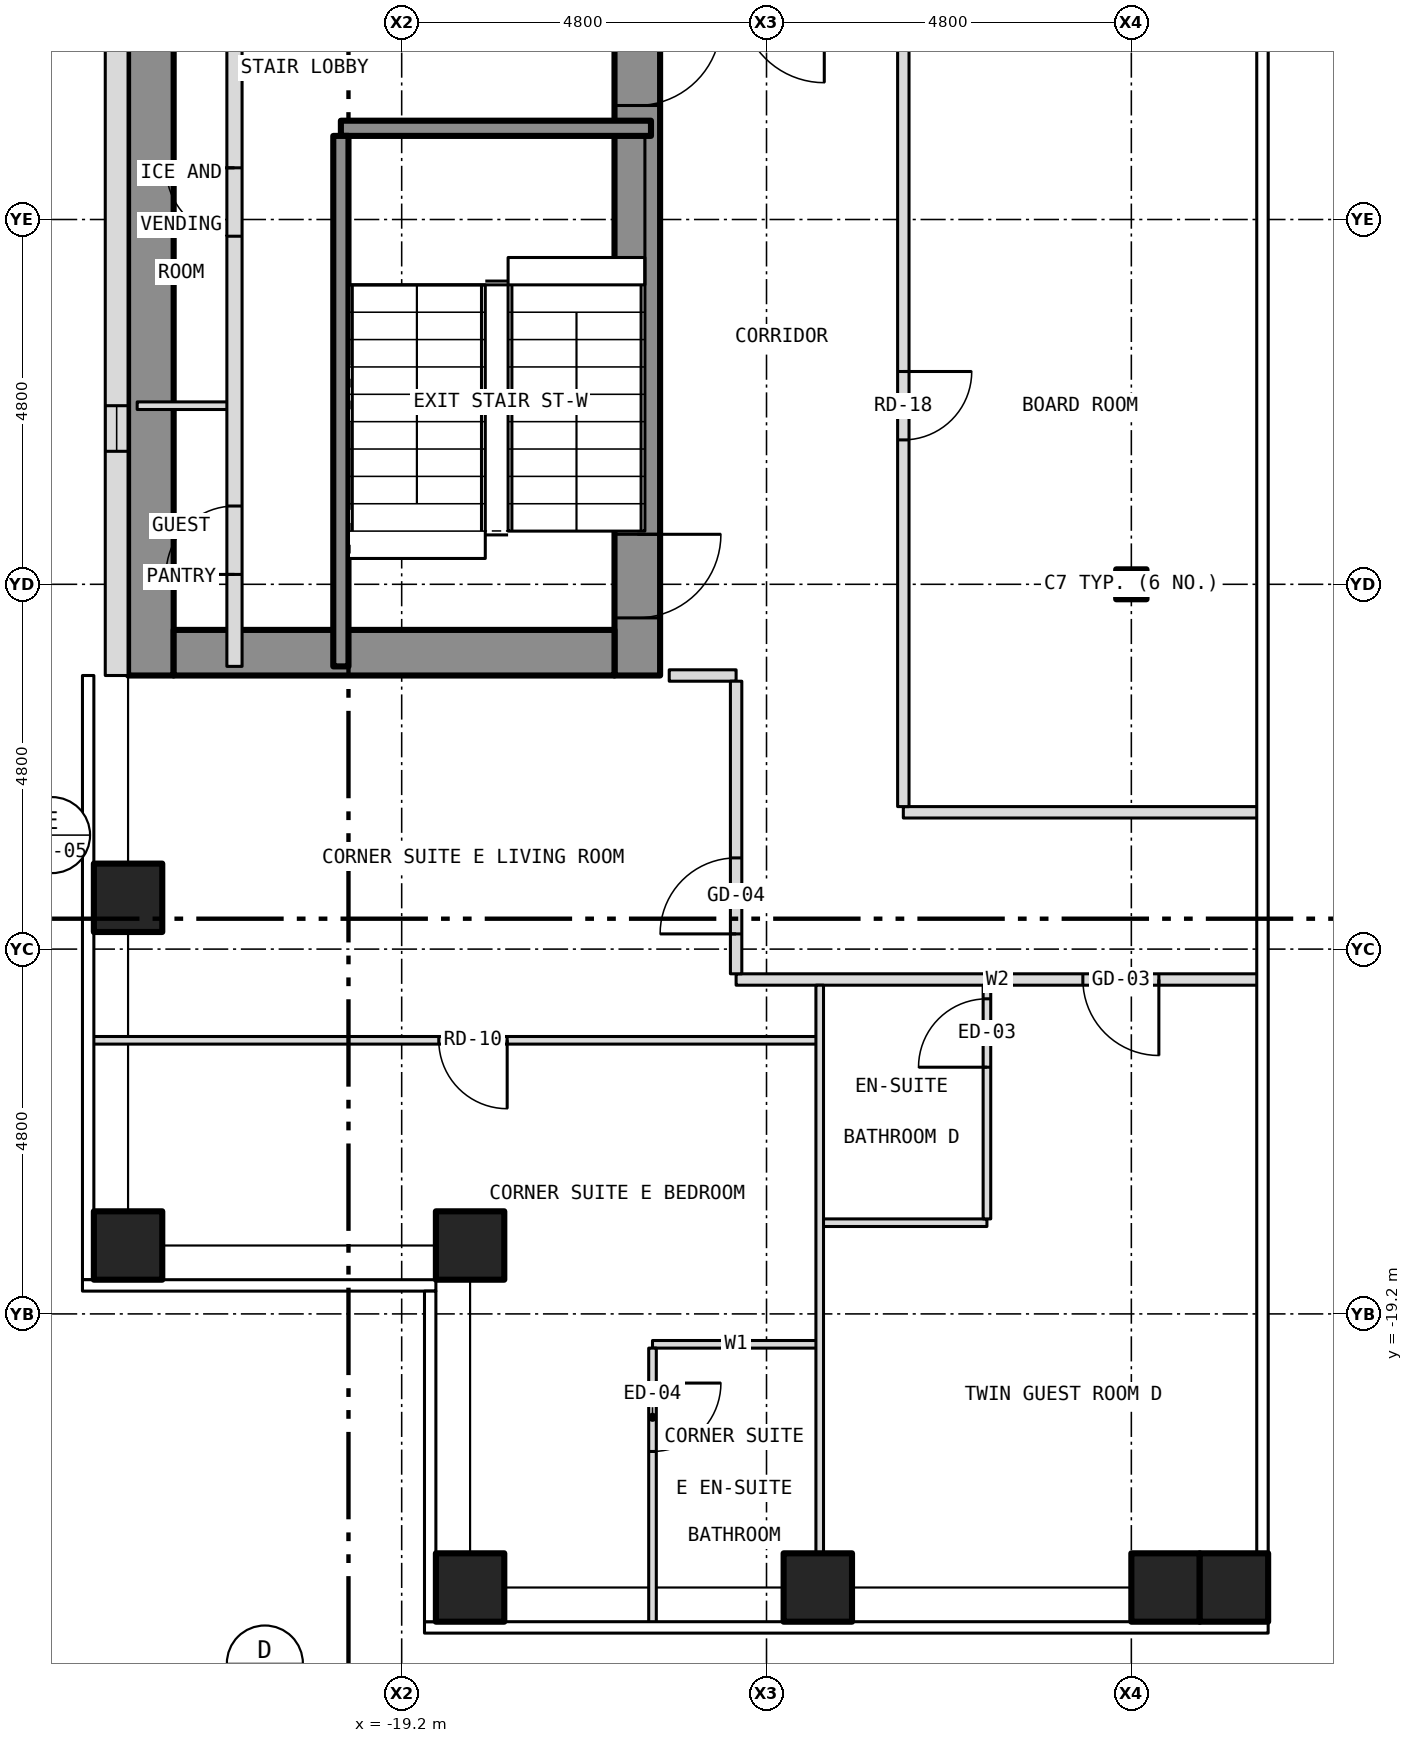
"""IFC4 building model, lengths in metres.
Left out: names, types, materials, properties, quantities, classifications, styles, units other than length and angle.
Written with IfcOpenShell. Run it as: python <this file> out.ifc"""

import sys

from ifc_helpers import new_model, si_unit, direction, frame, frame_2d, origin, origin_2d, place, context, subcontext, project, spatial, rectangle, hollow_rectangle, i_section, extrude, element, fill, save


model = new_model("IFC4")
c1 = context("Model", 3, precision=1e-05, world=origin(), true_north=direction((0.0, 1.0)))
c2 = subcontext(c1, "Body", "Model", "MODEL_VIEW")
j1 = project(units=[si_unit("LENGTHUNIT", "METRE"), si_unit("PLANEANGLEUNIT", "RADIAN")], contexts=[c1])
p1 = place(None, origin())
s1 = spatial("IfcSite", under=j1, at=p1, CompositionType="ELEMENT")
p2 = place(p1, origin())
s2 = spatial("IfcBuilding", under=s1, at=p2, CompositionType="ELEMENT")
p3 = place(p2, frame((0.0, 0.0, 131.0)))
s3 = spatial("IfcBuildingStorey", under=s2, at=p3, CompositionType="ELEMENT", Elevation=131.0)
for number, where, z_axis, x_axis in (
    (1, (-18.3, -22.8, -0.15), (0.0, 0.0, 1.0), (1.0, 0.0, 0.0)),
    (2, (-13.725, -22.8, -0.15), (0.0, 0.0, 1.0), (1.0, 0.0, 0.0)),
    (3, (-9.15, -22.8, -0.15), (0.0, 0.0, 1.0), (1.0, 0.0, 0.0)),
    (4, (-22.8, -18.3, -0.15), (0.0, 0.0, 1.0), (1.0, 0.0, 0.0)),
    (5, (-22.8, -13.725, -0.15), (0.0, 0.0, 1.0), (1.0, 0.0, 0.0)),
    (6, (-18.3, -18.3, -0.15), (0.0, 0.0, 1.0), (1.0, 0.0, 0.0)),
    (7, (-8.25, -22.8, -0.15), (0.0, 0.0, 1.0), (1.0, 0.0, 0.0)),
):
    element("IfcColumn", number, at=place(p3, frame(where, z_axis=z_axis, x_axis=x_axis)), inside=s3, PredefinedType="COLUMN", context=c2, shape_type="SweptSolid", body=[
        extrude(hollow_rectangle(XDim=0.9, YDim=0.9, WallThickness=0.05, at=origin_2d()), origin(), (0.0, 0.0, 1.0), 3.5),
    ])
p4 = place(p3, frame((-9.6, -9.6, -0.15), z_axis=(0.0, 0.0, 1.0), x_axis=(1.0, 0.0, 0.0)))
e8 = element("IfcColumn", 8, at=p4, inside=s3, PredefinedType="COLUMN", context=c2, shape_type="SweptSolid", body=[
    extrude(i_section(OverallWidth=0.399, OverallDepth=0.394, WebThickness=0.023, FlangeThickness=0.037, at=origin_2d()), origin(), (0.0, 0.0, 1.0), 3.5),
])
p5 = place(p3, frame((-16.1, -10.8, 0.0), z_axis=(0.0, 0.0, 1.0), x_axis=(0.0, 1.0, 0.0)))
e9 = element("IfcWall", 9, at=p5, inside=s3, PredefinedType="SHEAR", context=c2, shape_type="SweptSolid", body=[
    extrude(rectangle(XDim=21.6, YDim=0.6, at=frame_2d((10.8, 0.0))), origin(), (0.0, 0.0, 1.0), 3.25),
])
p6 = place(p5, frame((9.4, 0.0, 0.0)))
e10 = element("IfcOpeningElement", 10, at=p6, cuts=e9, PredefinedType="OPENING", context=c2, shape_type="SweptSolid", body=[
    extrude(rectangle(XDim=1.1, YDim=2.1, at=frame_2d((0.55, 1.05))), frame((0.0, 0.312, 0.0), z_axis=(0.0, -1.0, 0.0), x_axis=(1.0, 0.0, 0.0)), (0.0, 0.0, 1.0), 0.624),
])
p7 = place(p5, frame((11.5, 0.0, 0.0)))
e11 = element("IfcOpeningElement", 11, at=p7, cuts=e9, PredefinedType="OPENING", context=c2, shape_type="SweptSolid", body=[
    extrude(rectangle(XDim=1.1, YDim=2.1, at=frame_2d((0.55, 1.05))), frame((0.0, 0.312, 0.0), z_axis=(0.0, -1.0, 0.0), x_axis=(1.0, 0.0, 0.0)), (0.0, 0.0, 1.0), 0.624),
])
p8 = place(p5, frame((13.6, 0.0, 0.0)))
e12 = element("IfcOpeningElement", 12, at=p8, cuts=e9, PredefinedType="OPENING", context=c2, shape_type="SweptSolid", body=[
    extrude(rectangle(XDim=1.1, YDim=2.1, at=frame_2d((0.55, 1.05))), frame((0.0, 0.312, 0.0), z_axis=(0.0, -1.0, 0.0), x_axis=(1.0, 0.0, 0.0)), (0.0, 0.0, 1.0), 0.624),
])
p9 = place(p5, frame((15.7, 0.0, 0.0)))
e13 = element("IfcOpeningElement", 13, at=p9, cuts=e9, PredefinedType="OPENING", context=c2, shape_type="SweptSolid", body=[
    extrude(rectangle(XDim=1.1, YDim=2.1, at=frame_2d((0.55, 1.05))), frame((0.0, 0.312, 0.0), z_axis=(0.0, -1.0, 0.0), x_axis=(1.0, 0.0, 0.0)), (0.0, 0.0, 1.0), 0.624),
])
p10 = place(p5, frame((17.8, 0.0, 0.0)))
e14 = element("IfcOpeningElement", 14, at=p10, cuts=e9, PredefinedType="OPENING", context=c2, shape_type="SweptSolid", body=[
    extrude(rectangle(XDim=1.1, YDim=2.1, at=frame_2d((0.55, 1.05))), frame((0.0, 0.312, 0.0), z_axis=(0.0, -1.0, 0.0), x_axis=(1.0, 0.0, 0.0)), (0.0, 0.0, 1.0), 0.624),
])
p11 = place(p5, frame((0.758, 0.0, 0.0)))
e15 = element("IfcOpeningElement", 15, at=p11, cuts=e9, PredefinedType="OPENING", context=c2, shape_type="SweptSolid", body=[
    extrude(rectangle(XDim=1.1, YDim=2.1, at=frame_2d((0.55, 1.05))), frame((0.0, 0.312, 0.0), z_axis=(0.0, -1.0, 0.0), x_axis=(1.0, 0.0, 0.0)), (0.0, 0.0, 1.0), 0.624),
])
p12 = place(p5, frame((7.5, 0.0, 0.0)))
e16 = element("IfcOpeningElement", 16, at=p12, cuts=e9, PredefinedType="OPENING", context=c2, shape_type="SweptSolid", body=[
    extrude(rectangle(XDim=1.1, YDim=2.1, at=frame_2d((0.55, 1.05))), frame((0.0, 0.312, 0.0), z_axis=(0.0, -1.0, 0.0), x_axis=(1.0, 0.0, 0.0)), (0.0, 0.0, 1.0), 0.624),
])
p13 = place(p3, frame((-22.5, -10.8, 0.0), z_axis=(0.0, 0.0, 1.0), x_axis=(0.0, 1.0, 0.0)))
e17 = element("IfcWall", 17, at=p13, inside=s3, PredefinedType="SHEAR", context=c2, shape_type="SweptSolid", body=[
    extrude(rectangle(XDim=21.6, YDim=0.6, at=frame_2d((10.8, 0.0))), origin(), (0.0, 0.0, 1.0), 3.25),
])
p14 = place(p3, frame((-22.2, -10.5, 0.0), z_axis=(0.0, 0.0, 1.0), x_axis=(1.0, 0.0, 0.0)))
e18 = element("IfcWall", 18, at=p14, inside=s3, PredefinedType="SHEAR", context=c2, shape_type="SweptSolid", body=[
    extrude(rectangle(XDim=5.8, YDim=0.6, at=frame_2d((2.9, 0.0))), origin(), (0.0, 0.0, 1.0), 3.25),
])
p15 = place(p3, frame((-22.95, 10.8, 0.0), z_axis=(0.0, 0.0, 1.0), x_axis=(0.0, -1.0, 0.0)))
e19 = element("IfcWall", 19, at=p15, inside=s3, PredefinedType="SOLIDWALL", context=c2, shape_type="SweptSolid", body=[
    extrude(rectangle(XDim=21.6, YDim=0.3, at=frame_2d((10.8, 0.0))), origin(), (0.0, 0.0, 1.0), 3.5),
])
p16 = place(p15, frame((18.05, 0.0, 1.0)))
e20 = element("IfcOpeningElement", 20, at=p16, cuts=e19, PredefinedType="OPENING", context=c2, shape_type="SweptSolid", body=[
    extrude(rectangle(XDim=0.6, YDim=1.5, at=frame_2d((0.3, 0.75))), frame((0.0, 0.162, 0.0), z_axis=(0.0, -1.0, 0.0), x_axis=(1.0, 0.0, 0.0)), (0.0, 0.0, 1.0), 0.324),
])
for number, where, z_axis, x_axis in (
    (21, (-15.9, -19.6, 0.0), (0.0, 0.0, 1.0), (1.0, 0.0, 0.0)),
    (22, (-13.7, -18.0, 0.0), (0.0, 0.0, 1.0), (1.0, 0.0, 0.0)),
):
    element("IfcWall", number, at=place(p3, frame(where, z_axis=z_axis, x_axis=x_axis)), inside=s3, PredefinedType="PARTITIONING", context=c2, shape_type="SweptSolid", body=[
        extrude(rectangle(XDim=2.2, YDim=0.1, at=frame_2d((1.1, 0.0))), origin(), (0.0, 0.0, 1.0), 3.35),
    ])
p17 = place(p3, frame((-23.28, -15.6, 0.0), z_axis=(0.0, 0.0, 1.0), x_axis=(1.0, 0.0, 0.0)))
e23 = element("IfcWall", 23, at=p17, inside=s3, PredefinedType="PARTITIONING", context=c2, shape_type="SweptSolid", body=[
    extrude(rectangle(XDim=9.58, YDim=0.1, at=frame_2d((4.79, 0.0))), origin(), (0.0, 0.0, 1.0), 3.35),
])
p18 = place(p17, frame((4.568, 0.0, 0.0)))
e24 = element("IfcOpeningElement", 24, at=p18, cuts=e23, PredefinedType="OPENING", context=c2, shape_type="SweptSolid", body=[
    extrude(rectangle(XDim=0.9, YDim=2.1, at=frame_2d((0.45, 1.05))), frame((0.0, 0.062, 0.0), z_axis=(0.0, -1.0, 0.0), x_axis=(1.0, 0.0, 0.0)), (0.0, 0.0, 1.0), 0.124),
])
p19 = place(p3, frame((-14.8, -14.8, 0.0), z_axis=(0.0, 0.0, 1.0), x_axis=(1.0, 0.0, 0.0)))
e25 = element("IfcWall", 25, at=p19, inside=s3, PredefinedType="PARTITIONING", context=c2, shape_type="SweptSolid", body=[
    extrude(rectangle(XDim=6.88, YDim=0.15, at=frame_2d((3.44, 0.0))), origin(), (0.0, 0.0, 1.0), 3.35),
])
p20 = place(p19, frame((4.562, 0.0, 0.0)))
e26 = element("IfcOpeningElement", 26, at=p20, cuts=e25, PredefinedType="OPENING", context=c2, shape_type="SweptSolid", body=[
    extrude(rectangle(XDim=1.0, YDim=2.1, at=frame_2d((0.5, 1.05))), frame((0.0, 0.087, 0.0), z_axis=(0.0, -1.0, 0.0), x_axis=(1.0, 0.0, 0.0)), (0.0, 0.0, 1.0), 0.174),
])
p21 = place(p3, frame((-12.6, -12.6, 0.0), z_axis=(0.0, 0.0, 1.0), x_axis=(1.0, 0.0, 0.0)))
e27 = element("IfcWall", 27, at=p21, inside=s3, PredefinedType="PARTITIONING", context=c2, shape_type="SweptSolid", body=[
    extrude(rectangle(XDim=4.68, YDim=0.15, at=frame_2d((2.34, 0.0))), origin(), (0.0, 0.0, 1.0), 3.35),
])
p22 = place(p3, frame((-15.68, -10.8, 0.0), z_axis=(0.0, 0.0, 1.0), x_axis=(1.0, 0.0, 0.0)))
e28 = element("IfcWall", 28, at=p22, inside=s3, PredefinedType="PARTITIONING", context=c2, shape_type="SweptSolid", body=[
    extrude(rectangle(XDim=0.88, YDim=0.15, at=frame_2d((0.44, 0.0))), origin(), (0.0, 0.0, 1.0), 3.35),
])
p23 = place(p3, frame((-22.68, -7.25, 0.0), z_axis=(0.0, 0.0, 1.0), x_axis=(1.0, 0.0, 0.0)))
e29 = element("IfcWall", 29, at=p23, inside=s3, PredefinedType="PARTITIONING", context=c2, shape_type="SweptSolid", body=[
    extrude(rectangle(XDim=1.28, YDim=0.1, at=frame_2d((0.64, 0.0))), origin(), (0.0, 0.0, 1.0), 3.25),
])
p24 = place(p3, frame((-20.0, -3.6, 0.0), z_axis=(0.0, 0.0, 1.0), x_axis=(1.0, 0.0, 0.0)))
e30 = element("IfcWall", 30, at=p24, inside=s3, PredefinedType="SHEAR", context=c2, shape_type="SweptSolid", body=[
    extrude(rectangle(XDim=4.08, YDim=0.2, at=frame_2d((2.04, 0.0))), origin(), (0.0, 0.0, 1.0), 3.25),
])
p25 = place(p3, frame((-21.4, -10.68, 0.0), z_axis=(0.0, 0.0, 1.0), x_axis=(0.0, 1.0, 0.0)))
e31 = element("IfcWall", 31, at=p25, inside=s3, PredefinedType="PARTITIONING", context=c2, shape_type="SweptSolid", body=[
    extrude(rectangle(XDim=8.68, YDim=0.2, at=frame_2d((4.34, 0.0))), origin(), (0.0, 0.0, 1.0), 3.25),
])
p26 = place(p25, frame((1.21, 0.0, 0.0)))
e32 = element("IfcOpeningElement", 32, at=p26, cuts=e31, PredefinedType="OPENING", context=c2, shape_type="SweptSolid", body=[
    extrude(rectangle(XDim=0.9, YDim=2.1, at=frame_2d((0.45, 1.05))), frame((0.0, 0.112, 0.0), z_axis=(0.0, -1.0, 0.0), x_axis=(1.0, 0.0, 0.0)), (0.0, 0.0, 1.0), 0.224),
])
p27 = place(p25, frame((5.66, 0.0, 0.0)))
e33 = element("IfcOpeningElement", 33, at=p27, cuts=e31, PredefinedType="OPENING", context=c2, shape_type="SweptSolid", body=[
    extrude(rectangle(XDim=0.9, YDim=2.1, at=frame_2d((0.45, 1.05))), frame((0.0, 0.112, 0.0), z_axis=(0.0, -1.0, 0.0), x_axis=(1.0, 0.0, 0.0)), (0.0, 0.0, 1.0), 0.224),
])
p28 = place(p3, frame((-20.0, -10.68, 0.0), z_axis=(0.0, 0.0, 1.0), x_axis=(0.0, 1.0, 0.0)))
e34 = element("IfcWall", 34, at=p28, inside=s3, PredefinedType="SHEAR", context=c2, shape_type="SweptSolid", body=[
    extrude(rectangle(XDim=6.98, YDim=0.2, at=frame_2d((3.49, 0.0))), origin(), (0.0, 0.0, 1.0), 3.25),
])
p29 = place(p3, frame((-15.9, -23.28, 0.0), z_axis=(0.0, 0.0, 1.0), x_axis=(0.0, 1.0, 0.0)))
e35 = element("IfcWall", 35, at=p29, inside=s3, PredefinedType="PARTITIONING", context=c2, shape_type="SweptSolid", body=[
    extrude(rectangle(XDim=3.63, YDim=0.1, at=frame_2d((1.815, 0.0))), origin(), (0.0, 0.0, 1.0), 3.35),
])
p30 = place(p29, frame((2.27, 0.0, 0.0)))
e36 = element("IfcOpeningElement", 36, at=p30, cuts=e35, PredefinedType="OPENING", context=c2, shape_type="SweptSolid", body=[
    extrude(rectangle(XDim=0.9, YDim=2.1, at=frame_2d((0.45, 1.05))), frame((0.0, 0.062, 0.0), z_axis=(0.0, -1.0, 0.0), x_axis=(1.0, 0.0, 0.0)), (0.0, 0.0, 1.0), 0.124),
])
p31 = place(p3, frame((-14.8, -14.725, 0.0), z_axis=(0.0, 0.0, 1.0), x_axis=(0.0, 1.0, 0.0)))
e37 = element("IfcWall", 37, at=p31, inside=s3, PredefinedType="PARTITIONING", context=c2, shape_type="SweptSolid", body=[
    extrude(rectangle(XDim=3.85, YDim=0.15, at=frame_2d((1.925, 0.0))), origin(), (0.0, 0.0, 1.0), 3.35),
])
p32 = place(p31, frame((0.525, 0.0, 0.0)))
e38 = element("IfcOpeningElement", 38, at=p32, cuts=e37, PredefinedType="OPENING", context=c2, shape_type="SweptSolid", body=[
    extrude(rectangle(XDim=1.0, YDim=2.1, at=frame_2d((0.5, 1.05))), frame((0.0, 0.087, 0.0), z_axis=(0.0, -1.0, 0.0), x_axis=(1.0, 0.0, 0.0)), (0.0, 0.0, 1.0), 0.174),
])
p33 = place(p3, frame((-13.7, -22.68, 0.0), z_axis=(0.0, 0.0, 1.0), x_axis=(0.0, 1.0, 0.0)))
e39 = element("IfcWall", 39, at=p33, inside=s3, PredefinedType="PARTITIONING", context=c2, shape_type="SweptSolid", body=[
    extrude(rectangle(XDim=7.805, YDim=0.1, at=frame_2d((3.902, 0.0))), origin(), (0.0, 0.0, 1.0), 3.35),
])
p34 = place(p3, frame((-12.6, -12.525, 0.0), z_axis=(0.0, 0.0, 1.0), x_axis=(0.0, 1.0, 0.0)))
e40 = element("IfcWall", 40, at=p34, inside=s3, PredefinedType="PARTITIONING", context=c2, shape_type="SweptSolid", body=[
    extrude(rectangle(XDim=10.525, YDim=0.15, at=frame_2d((5.262, 0.0))), origin(), (0.0, 0.0, 1.0), 3.35),
])
p35 = place(p34, frame((4.825, 0.0, 0.0)))
e41 = element("IfcOpeningElement", 41, at=p35, cuts=e40, PredefinedType="OPENING", context=c2, shape_type="SweptSolid", body=[
    extrude(rectangle(XDim=0.9, YDim=2.1, at=frame_2d((0.45, 1.05))), frame((0.0, 0.087, 0.0), z_axis=(0.0, -1.0, 0.0), x_axis=(1.0, 0.0, 0.0)), (0.0, 0.0, 1.0), 0.174),
])
p36 = place(p3, frame((-11.5, -17.95, 0.0), z_axis=(0.0, 0.0, 1.0), x_axis=(0.0, 1.0, 0.0)))
e42 = element("IfcWall", 42, at=p36, inside=s3, PredefinedType="PARTITIONING", context=c2, shape_type="SweptSolid", body=[
    extrude(rectangle(XDim=3.075, YDim=0.1, at=frame_2d((1.538, 0.0))), origin(), (0.0, 0.0, 1.0), 3.35),
])
p37 = place(p36, frame((1.996, 0.0, 0.0)))
e43 = element("IfcOpeningElement", 43, at=p37, cuts=e42, PredefinedType="OPENING", context=c2, shape_type="SweptSolid", body=[
    extrude(rectangle(XDim=0.9, YDim=2.1, at=frame_2d((0.45, 1.05))), frame((0.0, 0.062, 0.0), z_axis=(0.0, -1.0, 0.0), x_axis=(1.0, 0.0, 0.0)), (0.0, 0.0, 1.0), 0.124),
])
p38 = place(p16, origin())
e44 = element("IfcWindow", 44, at=p38, inside=s3, PartitioningType="SINGLE_PANEL", PredefinedType="WINDOW", context=c2, shape_type="SweptSolid", body=[
    extrude(rectangle(XDim=0.6, YDim=1.5, at=frame_2d((0.3, 0.75))), frame((0.0, -0.06, 0.0), z_axis=(0.0, -1.0, 0.0), x_axis=(1.0, 0.0, 0.0)), (0.0, 0.0, 1.0), 0.06),
])
fill(e20, e44)
p39 = place(p11, origin())
e45 = element("IfcDoor", 45, at=p39, inside=s3, OperationType="SINGLE_SWING_RIGHT", PredefinedType="DOOR", context=c2, shape_type="SweptSolid", body=[
    extrude(rectangle(XDim=1.1, YDim=2.1, at=frame_2d((0.55, 1.05))), frame((0.0, 0.025, 0.0), z_axis=(0.0, -1.0, 0.0), x_axis=(1.0, 0.0, 0.0)), (0.0, 0.0, 1.0), 0.05),
])
fill(e15, e45)
p40 = place(p12, origin())
e46 = element("IfcDoor", 46, at=p40, inside=s3, OperationType="SINGLE_SWING_RIGHT", PredefinedType="DOOR", context=c2, shape_type="SweptSolid", body=[
    extrude(rectangle(XDim=1.1, YDim=2.1, at=frame_2d((0.55, 1.05))), frame((0.0, 0.025, 0.0), z_axis=(0.0, -1.0, 0.0), x_axis=(1.0, 0.0, 0.0)), (0.0, 0.0, 1.0), 0.05),
])
fill(e16, e46)
p41 = place(p26, origin())
e47 = element("IfcDoor", 47, at=p41, inside=s3, OperationType="SINGLE_SWING_LEFT", PredefinedType="DOOR", context=c2, shape_type="SweptSolid", body=[
    extrude(rectangle(XDim=0.9, YDim=2.1, at=frame_2d((0.45, 1.05))), frame((0.0, 0.025, 0.0), z_axis=(0.0, -1.0, 0.0), x_axis=(1.0, 0.0, 0.0)), (0.0, 0.0, 1.0), 0.05),
])
fill(e32, e47)
p42 = place(p27, origin())
e48 = element("IfcDoor", 48, at=p42, inside=s3, OperationType="SINGLE_SWING_RIGHT", PredefinedType="DOOR", context=c2, shape_type="SweptSolid", body=[
    extrude(rectangle(XDim=0.9, YDim=2.1, at=frame_2d((0.45, 1.05))), frame((0.0, 0.025, 0.0), z_axis=(0.0, -1.0, 0.0), x_axis=(1.0, 0.0, 0.0)), (0.0, 0.0, 1.0), 0.05),
])
fill(e33, e48)
p43 = place(p20, origin())
e49 = element("IfcDoor", 49, at=p43, inside=s3, OperationType="SINGLE_SWING_RIGHT", PredefinedType="DOOR", context=c2, shape_type="SweptSolid", body=[
    extrude(rectangle(XDim=1.0, YDim=2.1, at=frame_2d((0.5, 1.05))), frame((0.0, 0.025, 0.0), z_axis=(0.0, -1.0, 0.0), x_axis=(1.0, 0.0, 0.0)), (0.0, 0.0, 1.0), 0.05),
])
fill(e26, e49)
p44 = place(p37, origin())
e50 = element("IfcDoor", 50, at=p44, inside=s3, OperationType="SINGLE_SWING_LEFT", PredefinedType="DOOR", context=c2, shape_type="SweptSolid", body=[
    extrude(rectangle(XDim=0.9, YDim=2.1, at=frame_2d((0.45, 1.05))), frame((0.0, 0.025, 0.0), z_axis=(0.0, -1.0, 0.0), x_axis=(1.0, 0.0, 0.0)), (0.0, 0.0, 1.0), 0.05),
])
fill(e43, e50)
p45 = place(p32, origin())
e51 = element("IfcDoor", 51, at=p45, inside=s3, OperationType="SINGLE_SWING_LEFT", PredefinedType="DOOR", context=c2, shape_type="SweptSolid", body=[
    extrude(rectangle(XDim=1.0, YDim=2.1, at=frame_2d((0.5, 1.05))), frame((0.0, 0.025, 0.0), z_axis=(0.0, -1.0, 0.0), x_axis=(1.0, 0.0, 0.0)), (0.0, 0.0, 1.0), 0.05),
])
fill(e38, e51)
p46 = place(p18, origin())
e52 = element("IfcDoor", 52, at=p46, inside=s3, OperationType="SINGLE_SWING_RIGHT", PredefinedType="DOOR", context=c2, shape_type="SweptSolid", body=[
    extrude(rectangle(XDim=0.9, YDim=2.1, at=frame_2d((0.45, 1.05))), frame((0.0, 0.025, 0.0), z_axis=(0.0, -1.0, 0.0), x_axis=(1.0, 0.0, 0.0)), (0.0, 0.0, 1.0), 0.05),
])
fill(e24, e52)
p47 = place(p30, origin())
e53 = element("IfcDoor", 53, at=p47, inside=s3, OperationType="SINGLE_SWING_RIGHT", PredefinedType="DOOR", context=c2, shape_type="SweptSolid", body=[
    extrude(rectangle(XDim=0.9, YDim=2.1, at=frame_2d((0.45, 1.05))), frame((0.0, 0.025, 0.0), z_axis=(0.0, -1.0, 0.0), x_axis=(1.0, 0.0, 0.0)), (0.0, 0.0, 1.0), 0.05),
])
fill(e36, e53)
p48 = place(p35, origin())
e54 = element("IfcDoor", 54, at=p48, inside=s3, OperationType="SINGLE_SWING_RIGHT", PredefinedType="DOOR", context=c2, shape_type="SweptSolid", body=[
    extrude(rectangle(XDim=0.9, YDim=2.1, at=frame_2d((0.45, 1.05))), frame((0.0, 0.025, 0.0), z_axis=(0.0, -1.0, 0.0), x_axis=(1.0, 0.0, 0.0)), (0.0, 0.0, 1.0), 0.05),
])
fill(e41, e54)
save(model, sys.argv[1])
